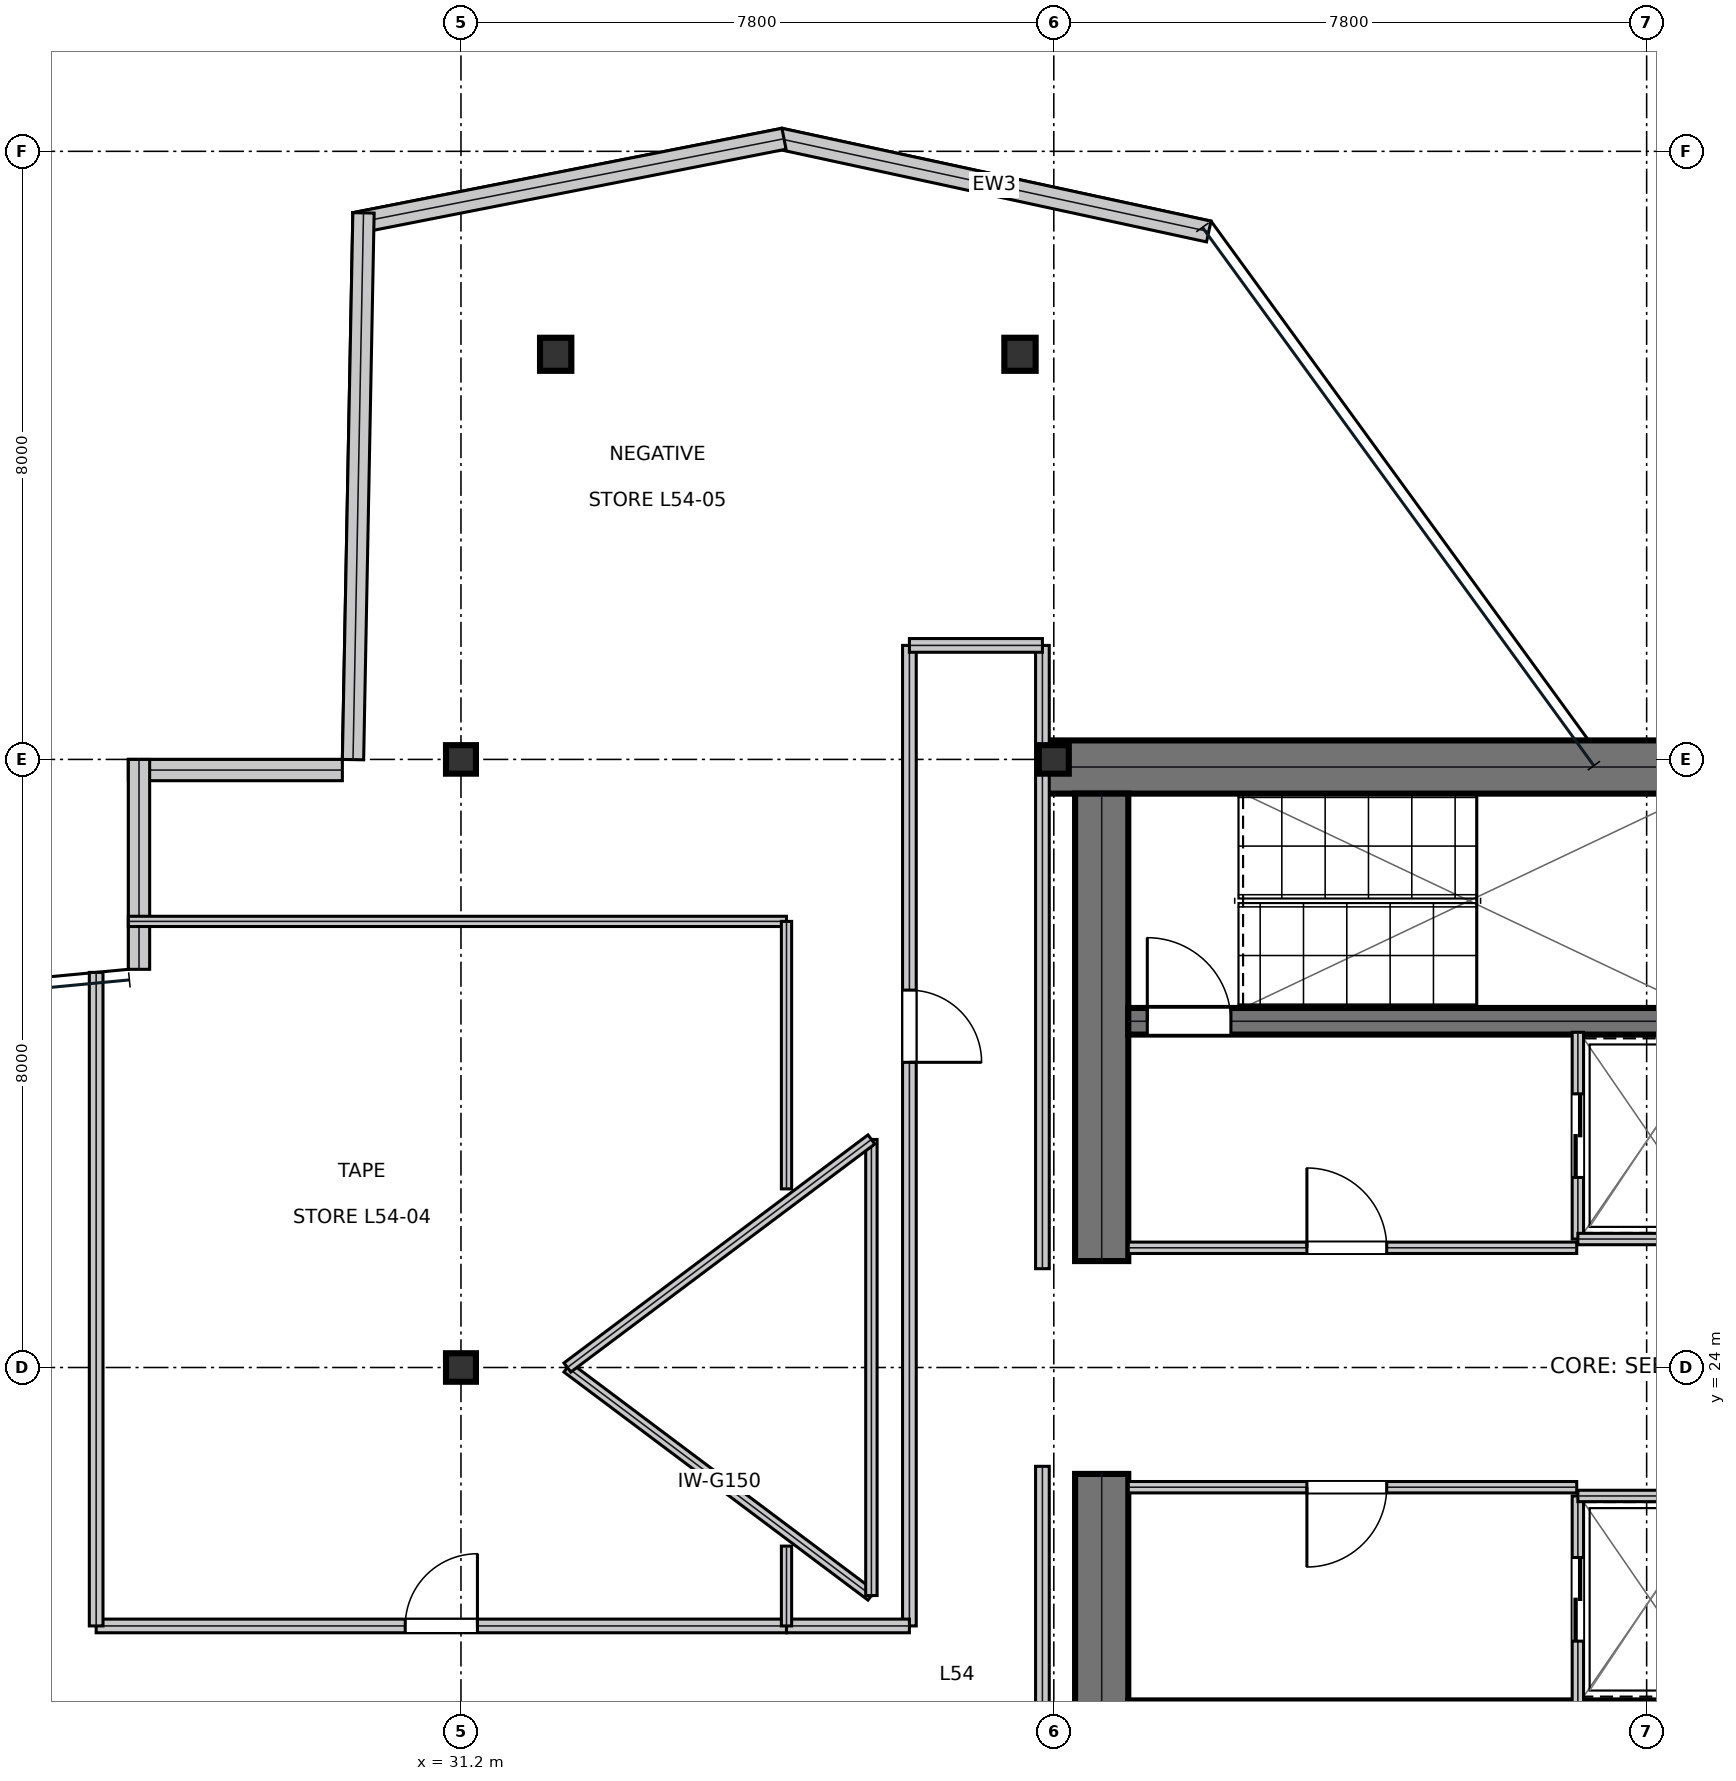
"""IFC4 building model, lengths in metres.
Left out: names, types, materials, properties, quantities, classifications, styles, units other than length and angle.
Written with IfcOpenShell. Run it as: python <this file> out.ifc"""

import sys

from ifc_helpers import new_model, si_unit, direction, frame, frame_2d, origin, origin_2d, place, context, subcontext, project, spatial, rectangle, i_section, extrude, element, fill, save


model = new_model("IFC4")
c1 = context("Model", 3, precision=1e-05, world=origin(), true_north=direction((0.0, 1.0)))
c2 = subcontext(c1, "Body", "Model", "MODEL_VIEW")
j1 = project(units=[si_unit("LENGTHUNIT", "METRE"), si_unit("PLANEANGLEUNIT", "RADIAN")], contexts=[c1])
p1 = place(None, origin())
s1 = spatial("IfcSite", under=j1, at=p1, CompositionType="ELEMENT")
p2 = place(p1, origin())
s2 = spatial("IfcBuilding", under=s1, at=p2, CompositionType="ELEMENT")
p3 = place(p2, frame((0.0, 0.0, 232.35)))
s3 = spatial("IfcBuildingStorey", under=s2, at=p3, CompositionType="ELEMENT", Elevation=232.35)
p4 = place(p3, frame((38.8, 31.9, 0.0), z_axis=(0.0, 0.0, 1.0), x_axis=(1.0, 0.0, 0.0)))
e1 = element("IfcWall", 1, at=p4, inside=s3, PredefinedType="SHEAR", context=c2, shape_type="SweptSolid", body=[
    extrude(rectangle(XDim=16.0, YDim=0.7, at=frame_2d((8.0, 0.0))), origin(), (0.0, 0.0, 1.0), 3.79),
])
for number, where, z_axis, x_axis in (
    (2, (39.63, 16.45, 0.0), (0.0, 0.0, 1.0), (0.0, 1.0, 0.0)),
    (3, (39.63, 25.4, 0.0), (0.0, 0.0, 1.0), (0.0, 1.0, 0.0)),
):
    element("IfcWall", number, at=place(p3, frame(where, z_axis=z_axis, x_axis=x_axis)), inside=s3, PredefinedType="SHEAR", context=c2, shape_type="SweptSolid", body=[
        extrude(rectangle(XDim=6.15, YDim=0.7, at=frame_2d((3.075, 0.0))), origin(), (0.0, 0.0, 1.0), 3.79),
    ])
p5 = place(p3, frame((39.98, 28.555, 0.0), z_axis=(0.0, 0.0, 1.0), x_axis=(1.0, 0.0, 0.0)))
e4 = element("IfcWall", 4, at=p5, inside=s3, PredefinedType="SHEAR", context=c2, shape_type="SweptSolid", body=[
    extrude(rectangle(XDim=7.71, YDim=0.35, at=frame_2d((3.855, 0.0))), origin(), (0.0, 0.0, 1.0), 3.79),
])
p6 = place(p5, frame((0.25, 0.0, 0.0)))
e5 = element("IfcOpeningElement", 5, at=p6, cuts=e4, PredefinedType="OPENING", context=c2, shape_type="SweptSolid", body=[
    extrude(rectangle(XDim=1.1, YDim=2.15, at=frame_2d((0.55, 1.075))), frame((0.0, 0.185, 0.0), z_axis=(0.0, -1.0, 0.0), x_axis=(1.0, 0.0, 0.0)), (0.0, 0.0, 1.0), 0.37),
])
p7 = place(p3, frame((39.98, 19.445, 0.0), z_axis=(0.0, 0.0, 1.0), x_axis=(1.0, 0.0, 0.0)))
e6 = element("IfcWall", 6, at=p7, inside=s3, PredefinedType="SHEAR", context=c2, shape_type="SweptSolid", body=[
    extrude(rectangle(XDim=7.71, YDim=0.35, at=frame_2d((3.855, 0.0))), origin(), (0.0, 0.0, 1.0), 3.79),
])
p8 = place(p7, frame((0.25, 0.0, 0.0)))
e7 = element("IfcOpeningElement", 7, at=p8, cuts=e6, PredefinedType="OPENING", context=c2, shape_type="SweptSolid", body=[
    extrude(rectangle(XDim=1.1, YDim=2.15, at=frame_2d((0.55, 1.075))), frame((0.0, 0.185, 0.0), z_axis=(0.0, -1.0, 0.0), x_axis=(1.0, 0.0, 0.0)), (0.0, 0.0, 1.0), 0.37),
])
for number, where, z_axis, x_axis in (
    (8, (31.2, 24.0, 0.0), (0.0, 0.0, 1.0), (1.0, 0.0, 0.0)),
    (9, (31.2, 32.0, 0.0), (0.0, 0.0, 1.0), (1.0, 0.0, 0.0)),
    (10, (39.0, 32.0, 0.0), (0.0, 0.0, 1.0), (1.0, 0.0, 0.0)),
):
    element("IfcColumn", number, at=place(p3, frame(where, z_axis=z_axis, x_axis=x_axis)), inside=s3, PredefinedType="COLUMN", context=c2, shape_type="SweptSolid", body=[
        extrude(i_section(OverallWidth=0.394, OverallDepth=0.375, WebThickness=0.017, FlangeThickness=0.028, at=origin_2d()), origin(), (0.0, 0.0, 1.0), 4.044),
    ])
p9 = place(p3, frame((32.446, 37.33, 0.016), z_axis=(0.010447648562, -0.022413850693, 0.999694186207), x_axis=(0.906371306068, 0.422482018004, 0.0)))
e11 = element("IfcColumn", 11, at=p9, inside=s3, PredefinedType="COLUMN", context=c2, shape_type="SweptSolid", body=[
    extrude(i_section(OverallWidth=0.412, OverallDepth=0.435, WebThickness=0.036, FlangeThickness=0.058, at=origin_2d()), origin(), (0.0, 0.0, 1.0), 4.019),
])
p10 = place(p3, frame((38.555, 37.33, 0.016), z_axis=(-0.00370544751, -0.022414920183, 0.999741887195), x_axis=(0.986609855888, -0.163098106258, 0.0)))
e12 = element("IfcColumn", 12, at=p10, inside=s3, PredefinedType="COLUMN", context=c2, shape_type="SweptSolid", body=[
    extrude(i_section(OverallWidth=0.412, OverallDepth=0.435, WebThickness=0.036, FlangeThickness=0.058, at=origin_2d()), origin(), (0.0, 0.0, 1.0), 4.019),
])
p11 = place(p3, frame((41.039, 38.945, 0.0), z_axis=(0.0, 0.0, 1.0), x_axis=(-0.977403545606, 0.211381903286, 0.0)))
e13 = element("IfcWall", 13, at=p11, inside=s3, PredefinedType="STANDARD", context=c2, shape_type="SweptSolid", body=[
    extrude(rectangle(XDim=5.776, YDim=0.28, at=frame_2d((2.888, 0.0))), origin(), (0.0, 0.0, 1.0), 3.79),
])
p12 = place(p3, frame((35.45, 40.166, 0.0), z_axis=(0.0, 0.0, 1.0), x_axis=(-0.981218426529, -0.192899972626, 0.0)))
e14 = element("IfcWall", 14, at=p12, inside=s3, PredefinedType="STANDARD", context=c2, shape_type="SweptSolid", body=[
    extrude(rectangle(XDim=5.754, YDim=0.28, at=frame_2d((2.877, 0.0))), origin(), (0.0, 0.0, 1.0), 3.79),
])
p13 = place(p3, frame((29.917, 39.19, 0.0), z_axis=(0.0, 0.0, 1.0), x_axis=(-0.019207643139, -0.999815516205, 0.0)))
e15 = element("IfcWall", 15, at=p13, inside=s3, PredefinedType="STANDARD", context=c2, shape_type="SweptSolid", body=[
    extrude(rectangle(XDim=7.194, YDim=0.28, at=frame_2d((3.597, 0.0))), origin(), (0.0, 0.0, 1.0), 3.79),
])
p14 = place(p3, frame((29.639, 31.86, 0.0), z_axis=(0.0, 0.0, 1.0), x_axis=(-1.0, 0.0, 0.0)))
e16 = element("IfcWall", 16, at=p14, inside=s3, PredefinedType="STANDARD", context=c2, shape_type="SweptSolid", body=[
    extrude(rectangle(XDim=2.815, YDim=0.28, at=frame_2d((1.408, 0.0))), origin(), (0.0, 0.0, 1.0), 3.79),
])
p15 = place(p3, frame((26.964, 32.0, 0.0), z_axis=(0.0, 0.0, 1.0), x_axis=(0.0, -1.0, 0.0)))
e17 = element("IfcWall", 17, at=p15, inside=s3, PredefinedType="STANDARD", context=c2, shape_type="SweptSolid", body=[
    extrude(rectangle(XDim=2.761, YDim=0.28, at=frame_2d((1.381, 0.0))), origin(), (0.0, 0.0, 1.0), 3.319),
])
p16 = place(p3, frame((39.98, 25.575, 0.0), z_axis=(0.0, 0.0, 1.0), x_axis=(1.0, 0.0, 0.0)))
e18 = element("IfcWall", 18, at=p16, inside=s3, PredefinedType="PARTITIONING", context=c2, shape_type="SweptSolid", body=[
    extrude(rectangle(XDim=5.9, YDim=0.15, at=frame_2d((2.95, 0.0))), origin(), (0.0, 0.0, 1.0), 3.79),
])
p17 = place(p16, frame((2.35, 0.0, 0.0)))
e19 = element("IfcOpeningElement", 19, at=p17, cuts=e18, PredefinedType="OPENING", context=c2, shape_type="SweptSolid", body=[
    extrude(rectangle(XDim=1.05, YDim=2.15, at=frame_2d((0.525, 1.075))), frame((0.0, 0.085, 0.0), z_axis=(0.0, -1.0, 0.0), x_axis=(1.0, 0.0, 0.0)), (0.0, 0.0, 1.0), 0.17),
])
p18 = place(p3, frame((39.98, 22.425, 0.0), z_axis=(0.0, 0.0, 1.0), x_axis=(1.0, 0.0, 0.0)))
e20 = element("IfcWall", 20, at=p18, inside=s3, PredefinedType="PARTITIONING", context=c2, shape_type="SweptSolid", body=[
    extrude(rectangle(XDim=5.9, YDim=0.15, at=frame_2d((2.95, 0.0))), origin(), (0.0, 0.0, 1.0), 3.79),
])
p19 = place(p18, frame((2.35, 0.0, 0.0)))
e21 = element("IfcOpeningElement", 21, at=p19, cuts=e20, PredefinedType="OPENING", context=c2, shape_type="SweptSolid", body=[
    extrude(rectangle(XDim=1.05, YDim=2.15, at=frame_2d((0.525, 1.075))), frame((0.0, 0.085, 0.0), z_axis=(0.0, -1.0, 0.0), x_axis=(1.0, 0.0, 0.0)), (0.0, 0.0, 1.0), 0.17),
])
p20 = place(p3, frame((45.895, 25.69, 0.0), z_axis=(0.0, 0.0, 1.0), x_axis=(0.0, 1.0, 0.0)))
e22 = element("IfcWall", 22, at=p20, inside=s3, PredefinedType="PARTITIONING", context=c2, shape_type="SweptSolid", body=[
    extrude(rectangle(XDim=2.72, YDim=0.15, at=frame_2d((1.36, 0.0))), origin(), (0.0, 0.0, 1.0), 3.79),
])
p21 = place(p20, frame((0.81, 0.0, 0.0)))
e23 = element("IfcOpeningElement", 23, at=p21, cuts=e22, PredefinedType="OPENING", context=c2, shape_type="SweptSolid", body=[
    extrude(rectangle(XDim=1.1, YDim=2.15, at=frame_2d((0.55, 1.075))), frame((0.0, 0.085, 0.0), z_axis=(0.0, -1.0, 0.0), x_axis=(1.0, 0.0, 0.0)), (0.0, 0.0, 1.0), 0.17),
])
p22 = place(p3, frame((45.895, 25.69, 0.0), z_axis=(0.0, 0.0, 1.0), x_axis=(1.0, 0.0, 0.0)))
e24 = element("IfcWall", 24, at=p22, inside=s3, PredefinedType="PARTITIONING", context=c2, shape_type="SweptSolid", body=[
    extrude(rectangle(XDim=1.915, YDim=0.15, at=frame_2d((0.958, 0.0))), origin(), (0.0, 0.0, 1.0), 3.79),
])
p23 = place(p3, frame((45.895, 19.59, 0.0), z_axis=(0.0, 0.0, 1.0), x_axis=(0.0, 1.0, 0.0)))
e25 = element("IfcWall", 25, at=p23, inside=s3, PredefinedType="PARTITIONING", context=c2, shape_type="SweptSolid", body=[
    extrude(rectangle(XDim=2.72, YDim=0.15, at=frame_2d((1.36, 0.0))), origin(), (0.0, 0.0, 1.0), 3.79),
])
p24 = place(p23, frame((0.81, 0.0, 0.0)))
e26 = element("IfcOpeningElement", 26, at=p24, cuts=e25, PredefinedType="OPENING", context=c2, shape_type="SweptSolid", body=[
    extrude(rectangle(XDim=1.1, YDim=2.15, at=frame_2d((0.55, 1.075))), frame((0.0, 0.085, 0.0), z_axis=(0.0, -1.0, 0.0), x_axis=(1.0, 0.0, 0.0)), (0.0, 0.0, 1.0), 0.17),
])
p25 = place(p3, frame((45.895, 22.31, 0.0), z_axis=(0.0, 0.0, 1.0), x_axis=(1.0, 0.0, 0.0)))
e27 = element("IfcWall", 27, at=p25, inside=s3, PredefinedType="PARTITIONING", context=c2, shape_type="SweptSolid", body=[
    extrude(rectangle(XDim=1.915, YDim=0.15, at=frame_2d((0.958, 0.0))), origin(), (0.0, 0.0, 1.0), 3.79),
])
p26 = place(p3, frame((26.4, 20.6, 0.0), z_axis=(0.0, 0.0, 1.0), x_axis=(1.0, 0.0, 0.0)))
e28 = element("IfcWall", 28, at=p26, inside=s3, PredefinedType="SOLIDWALL", context=c2, shape_type="SweptSolid", body=[
    extrude(rectangle(XDim=9.083, YDim=0.18, at=frame_2d((4.542, 0.0))), origin(), (0.0, 0.0, 1.0), 3.241),
])
p27 = place(p26, frame((4.066, 0.0, 0.0)))
e29 = element("IfcOpeningElement", 29, at=p27, cuts=e28, PredefinedType="OPENING", context=c2, shape_type="SweptSolid", body=[
    extrude(rectangle(XDim=0.95, YDim=2.15, at=frame_2d((0.475, 1.075))), frame((0.0, 0.1, 0.0), z_axis=(0.0, -1.0, 0.0), x_axis=(1.0, 0.0, 0.0)), (0.0, 0.0, 1.0), 0.2),
])
p28 = place(p3, frame((37.1, 20.6, 0.0), z_axis=(0.0, 0.0, 1.0), x_axis=(0.0, 1.0, 0.0)))
e30 = element("IfcWall", 30, at=p28, inside=s3, PredefinedType="SOLIDWALL", context=c2, shape_type="SweptSolid", body=[
    extrude(rectangle(XDim=12.9, YDim=0.18, at=frame_2d((6.45, 0.0))), origin(), (0.0, 0.0, 1.0), 3.241),
])
p29 = place(p28, frame((7.415, 0.0, 0.0)))
e31 = element("IfcOpeningElement", 31, at=p29, cuts=e30, PredefinedType="OPENING", context=c2, shape_type="SweptSolid", body=[
    extrude(rectangle(XDim=0.95, YDim=2.15, at=frame_2d((0.475, 1.075))), frame((0.0, 0.1, 0.0), z_axis=(0.0, -1.0, 0.0), x_axis=(1.0, 0.0, 0.0)), (0.0, 0.0, 1.0), 0.2),
])
p30 = place(p3, frame((38.85, 14.5, 0.0), z_axis=(0.0, 0.0, 1.0), x_axis=(0.0, 1.0, 0.0)))
e32 = element("IfcWall", 32, at=p30, inside=s3, PredefinedType="SOLIDWALL", context=c2, shape_type="SweptSolid", body=[
    extrude(rectangle(XDim=8.2, YDim=0.18, at=frame_2d((4.1, 0.0))), origin(), (0.0, 0.0, 1.0), 3.241),
])
p31 = place(p3, frame((26.4, 20.6, 0.0), z_axis=(0.0, 0.0, 1.0), x_axis=(0.0, 1.0, 0.0)))
e33 = element("IfcWall", 33, at=p31, inside=s3, PredefinedType="SOLIDWALL", context=c2, shape_type="SweptSolid", body=[
    extrude(rectangle(XDim=8.598, YDim=0.18, at=frame_2d((4.299, 0.0))), origin(), (0.0, 0.0, 1.0), 3.241),
])
p32 = place(p3, frame((38.85, 25.3, 0.0), z_axis=(0.0, 0.0, 1.0), x_axis=(0.0, 1.0, 0.0)))
e34 = element("IfcWall", 34, at=p32, inside=s3, PredefinedType="SOLIDWALL", context=c2, shape_type="SweptSolid", body=[
    extrude(rectangle(XDim=8.2, YDim=0.18, at=frame_2d((4.1, 0.0))), origin(), (0.0, 0.0, 1.0), 3.241),
])
p33 = place(p3, frame((37.1, 33.5, 0.0), z_axis=(0.0, 0.0, 1.0), x_axis=(1.0, 0.0, 0.0)))
e35 = element("IfcWall", 35, at=p33, inside=s3, PredefinedType="SOLIDWALL", context=c2, shape_type="SweptSolid", body=[
    extrude(rectangle(XDim=1.75, YDim=0.18, at=frame_2d((0.875, 0.0))), origin(), (0.0, 0.0, 1.0), 3.241),
])
p34 = place(p3, frame((35.483, 20.6, 0.0), z_axis=(0.0, 0.0, 1.0), x_axis=(1.0, 0.0, 0.0)))
e36 = element("IfcWall", 36, at=p34, inside=s3, PredefinedType="SOLIDWALL", context=c2, shape_type="SweptSolid", body=[
    extrude(rectangle(XDim=1.617, YDim=0.18, at=frame_2d((0.809, 0.0))), origin(), (0.0, 0.0, 1.0), 3.468),
])
p35 = place(p3, frame((26.824, 29.869, 0.0), z_axis=(0.0, 0.0, 1.0), x_axis=(1.0, 0.0, 0.0)))
e37 = element("IfcWall", 37, at=p35, inside=s3, PredefinedType="PARTITIONING", context=c2, shape_type="SweptSolid", body=[
    extrude(rectangle(XDim=8.659, YDim=0.135, at=frame_2d((4.33, 0.0))), origin(), (0.0, 0.0, 1.0), 3.241),
])
p36 = place(p3, frame((35.483, 26.35, 0.0), z_axis=(0.0, 0.0, 1.0), x_axis=(0.0, 1.0, 0.0)))
e38 = element("IfcWall", 38, at=p36, inside=s3, PredefinedType="PARTITIONING", context=c2, shape_type="SweptSolid", body=[
    extrude(rectangle(XDim=3.519, YDim=0.135, at=frame_2d((1.76, 0.0))), origin(), (0.0, 0.0, 1.0), 3.468),
])
p37 = place(p3, frame((35.483, 20.6, 0.0), z_axis=(0.0, 0.0, 1.0), x_axis=(0.0, 1.0, 0.0)))
e39 = element("IfcWall", 39, at=p37, inside=s3, PredefinedType="PARTITIONING", context=c2, shape_type="SweptSolid", body=[
    extrude(rectangle(XDim=1.05, YDim=0.135, at=frame_2d((0.525, 0.0))), origin(), (0.0, 0.0, 1.0), 3.79),
])
p38 = place(p3, frame((32.6, 24.0, 0.0), z_axis=(0.0, 0.0, 1.0), x_axis=(0.8, -0.6, 0.0)))
e40 = element("IfcWall", 40, at=p38, inside=s3, PredefinedType="MOVABLE", context=c2, shape_type="SweptSolid", body=[
    extrude(rectangle(XDim=5.0, YDim=0.15, at=frame_2d((2.5, 0.0))), origin(), (0.0, 0.0, 1.0), 3.79),
])
p39 = place(p3, frame((36.6, 21.0, 0.0), z_axis=(0.0, 0.0, 1.0), x_axis=(0.0, 1.0, 0.0)))
e41 = element("IfcWall", 41, at=p39, inside=s3, PredefinedType="MOVABLE", context=c2, shape_type="SweptSolid", body=[
    extrude(rectangle(XDim=6.0, YDim=0.15, at=frame_2d((3.0, 0.0))), origin(), (0.0, 0.0, 1.0), 3.79),
])
p40 = place(p3, frame((36.6, 27.0, 0.0), z_axis=(0.0, 0.0, 1.0), x_axis=(-0.8, -0.6, 0.0)))
e42 = element("IfcWall", 42, at=p40, inside=s3, PredefinedType="MOVABLE", context=c2, shape_type="SweptSolid", body=[
    extrude(rectangle(XDim=5.0, YDim=0.15, at=frame_2d((2.5, 0.0))), origin(), (0.0, 0.0, 1.0), 3.79),
])
p41 = place(p17, origin())
e43 = element("IfcDoor", 43, at=p41, inside=s3, OperationType="SINGLE_SWING_LEFT", PredefinedType="DOOR", context=c2, shape_type="SweptSolid", body=[
    extrude(rectangle(XDim=1.05, YDim=2.15, at=frame_2d((0.525, 1.075))), frame((0.0, 0.025, 0.0), z_axis=(0.0, -1.0, 0.0), x_axis=(1.0, 0.0, 0.0)), (0.0, 0.0, 1.0), 0.05),
])
fill(e19, e43)
p42 = place(p19, frame((1.05, 0.0, 0.0), z_axis=(0.0, 0.0, 1.0), x_axis=(-1.0, 0.0, 0.0)))
e44 = element("IfcDoor", 44, at=p42, inside=s3, OperationType="SINGLE_SWING_RIGHT", PredefinedType="DOOR", context=c2, shape_type="SweptSolid", body=[
    extrude(rectangle(XDim=1.05, YDim=2.15, at=frame_2d((0.525, 1.075))), frame((0.0, 0.025, 0.0), z_axis=(0.0, -1.0, 0.0), x_axis=(1.0, 0.0, 0.0)), (0.0, 0.0, 1.0), 0.05),
])
fill(e21, e44)
p43 = place(p21, frame((1.1, 0.0, 0.0), z_axis=(0.0, 0.0, 1.0), x_axis=(-1.0, 0.0, 0.0)))
e45 = element("IfcDoor", 45, at=p43, inside=s3, OperationType="DOUBLE_DOOR_SLIDING", PredefinedType="DOOR", context=c2, shape_type="SweptSolid", body=[
    extrude(rectangle(XDim=1.1, YDim=2.15, at=frame_2d((0.55, 1.075))), frame((0.0, 0.025, 0.0), z_axis=(0.0, -1.0, 0.0), x_axis=(1.0, 0.0, 0.0)), (0.0, 0.0, 1.0), 0.05),
])
fill(e23, e45)
p44 = place(p24, frame((1.1, 0.0, 0.0), z_axis=(0.0, 0.0, 1.0), x_axis=(-1.0, 0.0, 0.0)))
e46 = element("IfcDoor", 46, at=p44, inside=s3, OperationType="DOUBLE_DOOR_SLIDING", PredefinedType="DOOR", context=c2, shape_type="SweptSolid", body=[
    extrude(rectangle(XDim=1.1, YDim=2.15, at=frame_2d((0.55, 1.075))), frame((0.0, 0.025, 0.0), z_axis=(0.0, -1.0, 0.0), x_axis=(1.0, 0.0, 0.0)), (0.0, 0.0, 1.0), 0.05),
])
fill(e26, e46)
p45 = place(p27, origin())
e47 = element("IfcDoor", 47, at=p45, inside=s3, OperationType="SINGLE_SWING_RIGHT", PredefinedType="DOOR", context=c2, shape_type="SweptSolid", body=[
    extrude(rectangle(XDim=0.95, YDim=2.15, at=frame_2d((0.475, 1.075))), frame((0.0, 0.025, 0.0), z_axis=(0.0, -1.0, 0.0), x_axis=(1.0, 0.0, 0.0)), (0.0, 0.0, 1.0), 0.05),
])
fill(e29, e47)
p46 = place(p29, frame((0.95, 0.0, 0.0), z_axis=(0.0, 0.0, 1.0), x_axis=(-1.0, 0.0, 0.0)))
e48 = element("IfcDoor", 48, at=p46, inside=s3, OperationType="SINGLE_SWING_RIGHT", PredefinedType="DOOR", context=c2, shape_type="SweptSolid", body=[
    extrude(rectangle(XDim=0.95, YDim=2.15, at=frame_2d((0.475, 1.075))), frame((0.0, 0.025, 0.0), z_axis=(0.0, -1.0, 0.0), x_axis=(1.0, 0.0, 0.0)), (0.0, 0.0, 1.0), 0.05),
])
fill(e31, e48)
p47 = place(p6, origin())
e49 = element("IfcDoor", 49, at=p47, inside=s3, OperationType="SINGLE_SWING_LEFT", PredefinedType="DOOR", context=c2, shape_type="SweptSolid", body=[
    extrude(rectangle(XDim=1.1, YDim=2.15, at=frame_2d((0.55, 1.075))), frame((0.0, 0.025, 0.0), z_axis=(0.0, -1.0, 0.0), x_axis=(1.0, 0.0, 0.0)), (0.0, 0.0, 1.0), 0.05),
])
fill(e5, e49)
save(model, sys.argv[1])
